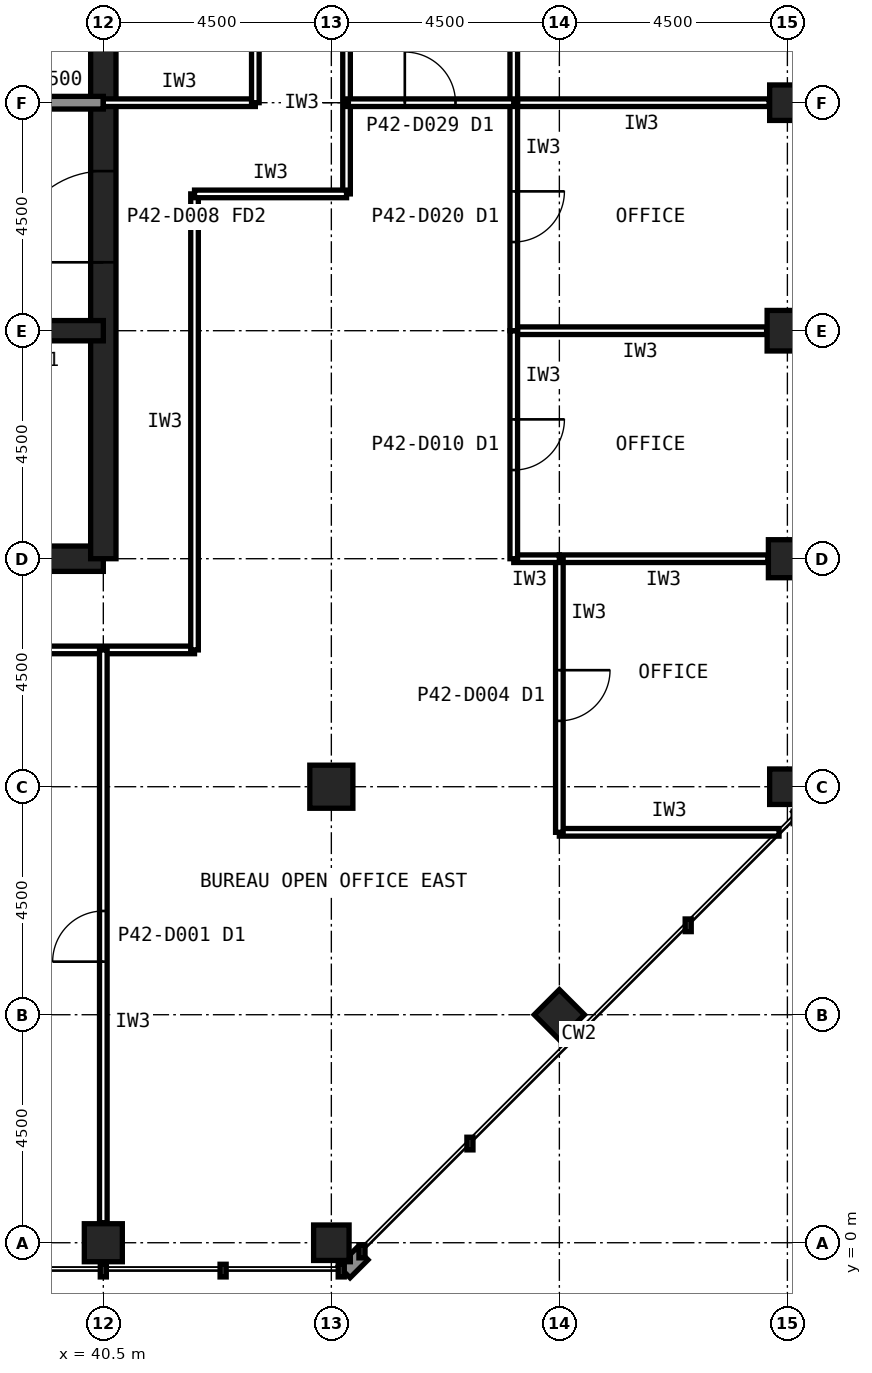
"""IFC4 building model, lengths in metres.
Left out: names, types, materials, properties, quantities, classifications, styles, units other than length and angle.
Written with IfcOpenShell. Run it as: python <this file> out.ifc"""

import sys

from ifc_helpers import new_model, si_unit, direction, frame, frame_2d, origin, origin_2d, place, context, subcontext, project, spatial, rectangle, hollow_rectangle, extrude, element, fill, save


model = new_model("IFC4")
c1 = context("Model", 3, precision=1e-05, world=origin(), true_north=direction((0.0, 1.0)))
c2 = subcontext(c1, "Body", "Model", "MODEL_VIEW")
j1 = project(units=[si_unit("LENGTHUNIT", "METRE"), si_unit("PLANEANGLEUNIT", "RADIAN")], contexts=[c1])
p1 = place(None, origin())
s1 = spatial("IfcSite", under=j1, at=p1, CompositionType="ELEMENT")
p2 = place(p1, origin())
s2 = spatial("IfcBuilding", under=s1, at=p2, CompositionType="ELEMENT")
p3 = place(p2, frame((0.0, 0.0, 175.6)))
s3 = spatial("IfcBuildingStorey", under=s2, at=p3, CompositionType="ELEMENT", Elevation=175.6)
p4 = place(p3, frame((40.5, 0.0, 0.0), z_axis=(0.0, 0.0, 1.0), x_axis=(1.0, 0.0, 0.0)))
e1 = element("IfcColumn", 1, at=p4, inside=s3, PredefinedType="COLUMN", context=c2, shape_type="SweptSolid", body=[
    extrude(hollow_rectangle(XDim=0.75, YDim=0.75, WallThickness=0.04, at=origin_2d()), origin(), (0.0, 0.0, 1.0), 4.0),
])
for number, where, z_axis, x_axis in (
    (2, (45.0, 0.0, 0.0), (0.0, 0.0, 1.0), (1.0, 0.0, 0.0)),
    (3, (54.0, 9.0, 0.0), (0.0, 0.0, 1.0), (1.0, 0.0, 0.0)),
):
    element("IfcColumn", number, at=place(p3, frame(where, z_axis=z_axis, x_axis=x_axis)), inside=s3, PredefinedType="COLUMN", context=c2, shape_type="SweptSolid", body=[
        extrude(hollow_rectangle(XDim=0.7, YDim=0.7, WallThickness=0.036, at=origin_2d()), origin(), (0.0, 0.0, 1.0), 4.0),
    ])
p5 = place(p3, frame((54.0, 13.5, 0.0), z_axis=(0.0, 0.0, 1.0), x_axis=(1.0, 0.0, 0.0)))
e4 = element("IfcColumn", 4, at=p5, inside=s3, PredefinedType="COLUMN", context=c2, shape_type="SweptSolid", body=[
    extrude(hollow_rectangle(XDim=0.75, YDim=0.75, WallThickness=0.04, at=origin_2d()), origin(), (0.0, 0.0, 1.0), 4.0),
])
p6 = place(p3, frame((54.0, 18.0, 0.0), z_axis=(0.0, 0.0, 1.0), x_axis=(1.0, 0.0, 0.0)))
e5 = element("IfcColumn", 5, at=p6, inside=s3, PredefinedType="COLUMN", context=c2, shape_type="SweptSolid", body=[
    extrude(hollow_rectangle(XDim=0.8, YDim=0.8, WallThickness=0.045, at=origin_2d()), origin(), (0.0, 0.0, 1.0), 4.0),
])
for number, where, z_axis, x_axis in (
    (6, (54.0, 22.5, 0.0), (0.0, 0.0, 1.0), (1.0, 0.0, 0.0)),
    (7, (49.5, 4.5, 0.0), (0.0, 0.0, 1.0), (0.707, 0.707, 0.0)),
):
    element("IfcColumn", number, at=place(p3, frame(where, z_axis=z_axis, x_axis=x_axis)), inside=s3, PredefinedType="COLUMN", context=c2, shape_type="SweptSolid", body=[
        extrude(hollow_rectangle(XDim=0.7, YDim=0.7, WallThickness=0.036, at=origin_2d()), origin(), (0.0, 0.0, 1.0), 4.0),
    ])
p7 = place(p3, frame((45.0, 9.0, 0.0), z_axis=(0.0, 0.0, 1.0), x_axis=(1.0, 0.0, 0.0)))
e8 = element("IfcColumn", 8, at=p7, inside=s3, PredefinedType="COLUMN", context=c2, shape_type="SweptSolid", body=[
    extrude(hollow_rectangle(XDim=0.85, YDim=0.85, WallThickness=0.05, at=origin_2d()), origin(), (0.0, 0.0, 1.0), 4.0),
])
p8 = place(p3, frame((13.5, 13.5, 0.0), z_axis=(0.0, 0.0, 1.0), x_axis=(1.0, 0.0, 0.0)))
e9 = element("IfcWall", 9, at=p8, inside=s3, PredefinedType="SHEAR", context=c2, shape_type="SweptSolid", body=[
    extrude(rectangle(XDim=27.0, YDim=0.5, at=frame_2d((13.5, 0.0))), origin(), (0.0, 0.0, 1.0), 4.0),
])
p9 = place(p3, frame((40.5, 13.5, 0.0), z_axis=(0.0, 0.0, 1.0), x_axis=(0.0, 1.0, 0.0)))
e10 = element("IfcWall", 10, at=p9, inside=s3, PredefinedType="SHEAR", context=c2, shape_type="SweptSolid", body=[
    extrude(rectangle(XDim=27.0, YDim=0.5, at=frame_2d((13.5, 0.0))), origin(), (0.0, 0.0, 1.0), 4.0),
])
p10 = place(p9, frame((5.85, 0.0, 0.0)))
e11 = element("IfcOpeningElement", 11, at=p10, cuts=e10, PredefinedType="OPENING", context=c2, shape_type="SweptSolid", body=[
    extrude(rectangle(XDim=1.8, YDim=2.1, at=frame_2d((0.9, 1.05))), frame((0.0, 0.26, 0.0), z_axis=(0.0, -1.0, 0.0), x_axis=(1.0, 0.0, 0.0)), (0.0, 0.0, 1.0), 0.52),
])
p11 = place(p9, frame((19.65, 0.0, 0.0)))
e12 = element("IfcOpeningElement", 12, at=p11, cuts=e10, PredefinedType="OPENING", context=c2, shape_type="SweptSolid", body=[
    extrude(rectangle(XDim=1.2, YDim=2.1, at=frame_2d((0.6, 1.05))), frame((0.0, 0.26, 0.0), z_axis=(0.0, -1.0, 0.0), x_axis=(1.0, 0.0, 0.0)), (0.0, 0.0, 1.0), 0.52),
])
p12 = place(p3, frame((13.5, 18.0, 0.0), z_axis=(0.0, 0.0, 1.0), x_axis=(1.0, 0.0, 0.0)))
e13 = element("IfcWall", 13, at=p12, inside=s3, PredefinedType="SHEAR", context=c2, shape_type="SweptSolid", body=[
    extrude(rectangle(XDim=27.0, YDim=0.4, at=frame_2d((13.5, 0.0))), origin(), (0.0, 0.0, 1.0), 4.0),
])
p13 = place(p12, frame((24.3, 0.0, 0.0)))
e14 = element("IfcOpeningElement", 14, at=p13, cuts=e13, PredefinedType="OPENING", context=c2, shape_type="SweptSolid", body=[
    extrude(rectangle(XDim=0.9, YDim=2.1, at=frame_2d((0.45, 1.05))), frame((0.0, 0.21, 0.0), z_axis=(0.0, -1.0, 0.0), x_axis=(1.0, 0.0, 0.0)), (0.0, 0.0, 1.0), 0.42),
])
p14 = place(p12, frame((5.45, 0.0, 0.0)))
e15 = element("IfcOpeningElement", 15, at=p14, cuts=e13, PredefinedType="OPENING", context=c2, shape_type="SweptSolid", body=[
    extrude(rectangle(XDim=1.1, YDim=2.1, at=frame_2d((0.55, 1.05))), frame((0.0, 0.21, 0.0), z_axis=(0.0, -1.0, 0.0), x_axis=(1.0, 0.0, 0.0)), (0.0, 0.0, 1.0), 0.42),
])
p15 = place(p12, frame((8.45, 0.0, 0.0)))
e16 = element("IfcOpeningElement", 16, at=p15, cuts=e13, PredefinedType="OPENING", context=c2, shape_type="SweptSolid", body=[
    extrude(rectangle(XDim=1.1, YDim=2.1, at=frame_2d((0.55, 1.05))), frame((0.0, 0.21, 0.0), z_axis=(0.0, -1.0, 0.0), x_axis=(1.0, 0.0, 0.0)), (0.0, 0.0, 1.0), 0.42),
])
p16 = place(p12, frame((11.45, 0.0, 0.0)))
e17 = element("IfcOpeningElement", 17, at=p16, cuts=e13, PredefinedType="OPENING", context=c2, shape_type="SweptSolid", body=[
    extrude(rectangle(XDim=1.1, YDim=2.1, at=frame_2d((0.55, 1.05))), frame((0.0, 0.21, 0.0), z_axis=(0.0, -1.0, 0.0), x_axis=(1.0, 0.0, 0.0)), (0.0, 0.0, 1.0), 0.42),
])
p17 = place(p12, frame((14.45, 0.0, 0.0)))
e18 = element("IfcOpeningElement", 18, at=p17, cuts=e13, PredefinedType="OPENING", context=c2, shape_type="SweptSolid", body=[
    extrude(rectangle(XDim=1.1, YDim=2.1, at=frame_2d((0.55, 1.05))), frame((0.0, 0.21, 0.0), z_axis=(0.0, -1.0, 0.0), x_axis=(1.0, 0.0, 0.0)), (0.0, 0.0, 1.0), 0.42),
])
p18 = place(p12, frame((17.45, 0.0, 0.0)))
e19 = element("IfcOpeningElement", 19, at=p18, cuts=e13, PredefinedType="OPENING", context=c2, shape_type="SweptSolid", body=[
    extrude(rectangle(XDim=1.1, YDim=2.1, at=frame_2d((0.55, 1.05))), frame((0.0, 0.21, 0.0), z_axis=(0.0, -1.0, 0.0), x_axis=(1.0, 0.0, 0.0)), (0.0, 0.0, 1.0), 0.42),
])
p19 = place(p12, frame((20.45, 0.0, 0.0)))
e20 = element("IfcOpeningElement", 20, at=p19, cuts=e13, PredefinedType="OPENING", context=c2, shape_type="SweptSolid", body=[
    extrude(rectangle(XDim=1.1, YDim=2.1, at=frame_2d((0.55, 1.05))), frame((0.0, 0.21, 0.0), z_axis=(0.0, -1.0, 0.0), x_axis=(1.0, 0.0, 0.0)), (0.0, 0.0, 1.0), 0.42),
])
p20 = place(p12, frame((1.6, 0.0, 0.0)))
e21 = element("IfcOpeningElement", 21, at=p20, cuts=e13, PredefinedType="OPENING", context=c2, shape_type="SweptSolid", body=[
    extrude(rectangle(XDim=1.3, YDim=2.2, at=frame_2d((0.65, 1.1))), frame((0.0, 0.21, 0.0), z_axis=(0.0, -1.0, 0.0), x_axis=(1.0, 0.0, 0.0)), (0.0, 0.0, 1.0), 0.42),
])
p21 = place(p3, frame((13.5, 22.5, 0.0), z_axis=(0.0, 0.0, 1.0), x_axis=(1.0, 0.0, 0.0)))
e22 = element("IfcWall", 22, at=p21, inside=s3, PredefinedType="SOLIDWALL", context=c2, shape_type="SweptSolid", body=[
    extrude(rectangle(XDim=27.0, YDim=0.25, at=frame_2d((13.5, 0.0))), origin(), (0.0, 0.0, 1.0), 3.84),
])
p22 = place(p21, frame((1.65, 0.0, 0.0)))
e23 = element("IfcOpeningElement", 23, at=p22, cuts=e22, PredefinedType="OPENING", context=c2, shape_type="SweptSolid", body=[
    extrude(rectangle(XDim=1.2, YDim=2.1, at=frame_2d((0.6, 1.05))), frame((0.0, 0.135, 0.0), z_axis=(0.0, -1.0, 0.0), x_axis=(1.0, 0.0, 0.0)), (0.0, 0.0, 1.0), 0.27),
])
p23 = place(p21, frame((6.025, 0.0, 0.0)))
e24 = element("IfcOpeningElement", 24, at=p23, cuts=e22, PredefinedType="OPENING", context=c2, shape_type="SweptSolid", body=[
    extrude(rectangle(XDim=1.0, YDim=2.1, at=frame_2d((0.5, 1.05))), frame((0.0, 0.135, 0.0), z_axis=(0.0, -1.0, 0.0), x_axis=(1.0, 0.0, 0.0)), (0.0, 0.0, 1.0), 0.27),
])
p24 = place(p21, frame((10.525, 0.0, 0.0)))
e25 = element("IfcOpeningElement", 25, at=p24, cuts=e22, PredefinedType="OPENING", context=c2, shape_type="SweptSolid", body=[
    extrude(rectangle(XDim=1.0, YDim=2.1, at=frame_2d((0.5, 1.05))), frame((0.0, 0.135, 0.0), z_axis=(0.0, -1.0, 0.0), x_axis=(1.0, 0.0, 0.0)), (0.0, 0.0, 1.0), 0.27),
])
p25 = place(p21, frame((19.75, 0.0, 0.0)))
e26 = element("IfcOpeningElement", 26, at=p25, cuts=e22, PredefinedType="OPENING", context=c2, shape_type="SweptSolid", body=[
    extrude(rectangle(XDim=1.0, YDim=2.1, at=frame_2d((0.5, 1.05))), frame((0.0, 0.135, 0.0), z_axis=(0.0, -1.0, 0.0), x_axis=(1.0, 0.0, 0.0)), (0.0, 0.0, 1.0), 0.27),
])
p26 = place(p21, frame((15.05, 0.0, 0.0)))
e27 = element("IfcOpeningElement", 27, at=p26, cuts=e22, PredefinedType="OPENING", context=c2, shape_type="SweptSolid", body=[
    extrude(rectangle(XDim=1.4, YDim=2.4, at=frame_2d((0.7, 1.2))), frame((0.0, 0.135, 0.0), z_axis=(0.0, -1.0, 0.0), x_axis=(1.0, 0.0, 0.0)), (0.0, 0.0, 1.0), 0.27),
])
p27 = place(p3, frame((45.3, 20.7, 0.0), z_axis=(0.0, 0.0, 1.0), x_axis=(0.0, 1.0, 0.0)))
e28 = element("IfcWall", 28, at=p27, inside=s3, PredefinedType="PARTITIONING", context=c2, shape_type="SweptSolid", body=[
    extrude(rectangle(XDim=12.6, YDim=0.15, at=frame_2d((6.3, 0.0))), origin(), (0.0, 0.0, 1.0), 3.84),
])
p28 = place(p27, frame((5.8, 0.0, 0.0)))
e29 = element("IfcOpeningElement", 29, at=p28, cuts=e28, PredefinedType="OPENING", context=c2, shape_type="SweptSolid", body=[
    extrude(rectangle(XDim=1.0, YDim=2.1, at=frame_2d((0.5, 1.05))), frame((0.0, 0.085, 0.0), z_axis=(0.0, -1.0, 0.0), x_axis=(1.0, 0.0, 0.0)), (0.0, 0.0, 1.0), 0.17),
])
for number, where, z_axis, x_axis in (
    (30, (33.3, 11.7, 0.0), (0.0, 0.0, 1.0), (1.0, 0.0, 0.0)),
    (31, (42.3, 11.7, 0.0), (0.0, 0.0, 1.0), (0.0, 1.0, 0.0)),
):
    element("IfcWall", number, at=place(p3, frame(where, z_axis=z_axis, x_axis=x_axis)), inside=s3, PredefinedType="PARTITIONING", context=c2, shape_type="SweptSolid", body=[
        extrude(rectangle(XDim=9.0, YDim=0.15, at=frame_2d((4.5, 0.0))), origin(), (0.0, 0.0, 1.0), 3.84),
    ])
p29 = place(p3, frame((42.3, 20.7, 0.0), z_axis=(0.0, 0.0, 1.0), x_axis=(1.0, 0.0, 0.0)))
e32 = element("IfcWall", 32, at=p29, inside=s3, PredefinedType="PARTITIONING", context=c2, shape_type="SweptSolid", body=[
    extrude(rectangle(XDim=3.0, YDim=0.15, at=frame_2d((1.5, 0.0))), origin(), (0.0, 0.0, 1.0), 3.84),
])
p30 = place(p3, frame((49.5, 8.1, 0.0), z_axis=(0.0, 0.0, 1.0), x_axis=(1.0, 0.0, 0.0)))
e33 = element("IfcWall", 33, at=p30, inside=s3, PredefinedType="PARTITIONING", context=c2, shape_type="SweptSolid", body=[
    extrude(rectangle(XDim=4.335, YDim=0.15, at=frame_2d((2.168, 0.0))), origin(), (0.0, 0.0, 1.0), 3.84),
])
p31 = place(p3, frame((53.615, 13.5, 0.0), z_axis=(0.0, 0.0, 1.0), x_axis=(-1.0, 0.0, 0.0)))
e34 = element("IfcWall", 34, at=p31, inside=s3, PredefinedType="PARTITIONING", context=c2, shape_type="SweptSolid", body=[
    extrude(rectangle(XDim=4.115, YDim=0.15, at=frame_2d((2.058, 0.0))), origin(), (0.0, 0.0, 1.0), 2.989),
])
p32 = place(p3, frame((49.5, 13.5, 0.0), z_axis=(0.0, 0.0, 1.0), x_axis=(0.0, -1.0, 0.0)))
e35 = element("IfcWall", 35, at=p32, inside=s3, PredefinedType="PARTITIONING", context=c2, shape_type="SweptSolid", body=[
    extrude(rectangle(XDim=5.4, YDim=0.15, at=frame_2d((2.7, 0.0))), origin(), (0.0, 0.0, 1.0), 3.84),
])
p33 = place(p32, frame((2.2, 0.0, 0.0)))
e36 = element("IfcOpeningElement", 36, at=p33, cuts=e35, PredefinedType="OPENING", context=c2, shape_type="SweptSolid", body=[
    extrude(rectangle(XDim=1.0, YDim=2.1, at=frame_2d((0.5, 1.05))), frame((0.0, 0.085, 0.0), z_axis=(0.0, -1.0, 0.0), x_axis=(1.0, 0.0, 0.0)), (0.0, 0.0, 1.0), 0.17),
])
p34 = place(p3, frame((48.6, 13.5, 0.0), z_axis=(0.0, 0.0, 1.0), x_axis=(1.0, 0.0, 0.0)))
e37 = element("IfcWall", 37, at=p34, inside=s3, PredefinedType="PARTITIONING", context=c2, shape_type="SweptSolid", body=[
    extrude(rectangle(XDim=0.9, YDim=0.15, at=frame_2d((0.45, 0.0))), origin(), (0.0, 0.0, 1.0), 2.989),
])
p35 = place(p3, frame((53.59, 18.0, 0.0), z_axis=(0.0, 0.0, 1.0), x_axis=(-1.0, 0.0, 0.0)))
e38 = element("IfcWall", 38, at=p35, inside=s3, PredefinedType="PARTITIONING", context=c2, shape_type="SweptSolid", body=[
    extrude(rectangle(XDim=4.99, YDim=0.15, at=frame_2d((2.495, 0.0))), origin(), (0.0, 0.0, 1.0), 2.989),
])
p36 = place(p3, frame((48.6, 18.0, 0.0), z_axis=(0.0, 0.0, 1.0), x_axis=(0.0, -1.0, 0.0)))
e39 = element("IfcWall", 39, at=p36, inside=s3, PredefinedType="PARTITIONING", context=c2, shape_type="SweptSolid", body=[
    extrude(rectangle(XDim=4.5, YDim=0.15, at=frame_2d((2.25, 0.0))), origin(), (0.0, 0.0, 1.0), 3.84),
])
p37 = place(p36, frame((1.75, 0.0, 0.0)))
e40 = element("IfcOpeningElement", 40, at=p37, cuts=e39, PredefinedType="OPENING", context=c2, shape_type="SweptSolid", body=[
    extrude(rectangle(XDim=1.0, YDim=2.1, at=frame_2d((0.5, 1.05))), frame((0.0, 0.085, 0.0), z_axis=(0.0, -1.0, 0.0), x_axis=(1.0, 0.0, 0.0)), (0.0, 0.0, 1.0), 0.17),
])
p38 = place(p3, frame((53.64, 22.5, 0.0), z_axis=(0.0, 0.0, 1.0), x_axis=(-1.0, 0.0, 0.0)))
e41 = element("IfcWall", 41, at=p38, inside=s3, PredefinedType="PARTITIONING", context=c2, shape_type="SweptSolid", body=[
    extrude(rectangle(XDim=5.04, YDim=0.15, at=frame_2d((2.52, 0.0))), origin(), (0.0, 0.0, 1.0), 2.989),
])
p39 = place(p3, frame((48.6, 22.5, 0.0), z_axis=(0.0, 0.0, 1.0), x_axis=(0.0, -1.0, 0.0)))
e42 = element("IfcWall", 42, at=p39, inside=s3, PredefinedType="PARTITIONING", context=c2, shape_type="SweptSolid", body=[
    extrude(rectangle(XDim=4.5, YDim=0.15, at=frame_2d((2.25, 0.0))), origin(), (0.0, 0.0, 1.0), 3.84),
])
p40 = place(p39, frame((1.75, 0.0, 0.0)))
e43 = element("IfcOpeningElement", 43, at=p40, cuts=e42, PredefinedType="OPENING", context=c2, shape_type="SweptSolid", body=[
    extrude(rectangle(XDim=1.0, YDim=2.1, at=frame_2d((0.5, 1.05))), frame((0.0, 0.085, 0.0), z_axis=(0.0, -1.0, 0.0), x_axis=(1.0, 0.0, 0.0)), (0.0, 0.0, 1.0), 0.17),
])
p41 = place(p3, frame((48.6, 27.0, 0.0), z_axis=(0.0, 0.0, 1.0), x_axis=(0.0, -1.0, 0.0)))
e44 = element("IfcWall", 44, at=p41, inside=s3, PredefinedType="PARTITIONING", context=c2, shape_type="SweptSolid", body=[
    extrude(rectangle(XDim=4.5, YDim=0.15, at=frame_2d((2.25, 0.0))), origin(), (0.0, 0.0, 1.0), 3.84),
])
p42 = place(p41, frame((1.75, 0.0, 0.0)))
e45 = element("IfcOpeningElement", 45, at=p42, cuts=e44, PredefinedType="OPENING", context=c2, shape_type="SweptSolid", body=[
    extrude(rectangle(XDim=1.0, YDim=2.1, at=frame_2d((0.5, 1.05))), frame((0.0, 0.085, 0.0), z_axis=(0.0, -1.0, 0.0), x_axis=(1.0, 0.0, 0.0)), (0.0, 0.0, 1.0), 0.17),
])
p43 = place(p3, frame((40.5, 22.5, 0.0), z_axis=(0.0, 0.0, 1.0), x_axis=(1.0, 0.0, 0.0)))
e46 = element("IfcWall", 46, at=p43, inside=s3, PredefinedType="PARTITIONING", context=c2, shape_type="SweptSolid", body=[
    extrude(rectangle(XDim=3.0, YDim=0.15, at=frame_2d((1.5, 0.0))), origin(), (0.0, 0.0, 1.0), 2.989),
])
p44 = place(p3, frame((43.5, 22.5, 0.0), z_axis=(0.0, 0.0, 1.0), x_axis=(0.0, 1.0, 0.0)))
e47 = element("IfcWall", 47, at=p44, inside=s3, PredefinedType="PARTITIONING", context=c2, shape_type="SweptSolid", body=[
    extrude(rectangle(XDim=9.0, YDim=0.15, at=frame_2d((4.5, 0.0))), origin(), (0.0, 0.0, 1.0), 3.84),
])
p45 = place(p3, frame((40.5, 0.395, 0.0), z_axis=(0.0, 0.0, 1.0), x_axis=(0.0, 1.0, 0.0)))
e48 = element("IfcWall", 48, at=p45, inside=s3, PredefinedType="PARTITIONING", context=c2, shape_type="SweptSolid", body=[
    extrude(rectangle(XDim=11.305, YDim=0.15, at=frame_2d((5.652, 0.0))), origin(), (0.0, 0.0, 1.0), 2.989),
])
p46 = place(p45, frame((5.153, 0.0, 0.0)))
e49 = element("IfcOpeningElement", 49, at=p46, cuts=e48, PredefinedType="OPENING", context=c2, shape_type="SweptSolid", body=[
    extrude(rectangle(XDim=1.0, YDim=2.1, at=frame_2d((0.5, 1.05))), frame((0.0, 0.085, 0.0), z_axis=(0.0, -1.0, 0.0), x_axis=(1.0, 0.0, 0.0)), (0.0, 0.0, 1.0), 0.17),
])
p47 = place(p3, frame((45.3, 22.5, 0.0), z_axis=(0.0, 0.0, 1.0), x_axis=(1.0, 0.0, 0.0)))
e50 = element("IfcWall", 50, at=p47, inside=s3, PredefinedType="PARTITIONING", context=c2, shape_type="SweptSolid", body=[
    extrude(rectangle(XDim=3.3, YDim=0.15, at=frame_2d((1.65, 0.0))), origin(), (0.0, 0.0, 1.0), 2.989),
])
p48 = place(p47, frame((1.15, 0.0, 0.0)))
e51 = element("IfcOpeningElement", 51, at=p48, cuts=e50, PredefinedType="OPENING", context=c2, shape_type="SweptSolid", body=[
    extrude(rectangle(XDim=1.0, YDim=2.1, at=frame_2d((0.5, 1.05))), frame((0.0, 0.085, 0.0), z_axis=(0.0, -1.0, 0.0), x_axis=(1.0, 0.0, 0.0)), (0.0, 0.0, 1.0), 0.17),
])
p49 = place(p10, origin())
e52 = element("IfcDoor", 52, at=p49, inside=s3, OperationType="SINGLE_SWING_LEFT", PredefinedType="DOOR", context=c2, shape_type="SweptSolid", body=[
    extrude(rectangle(XDim=1.8, YDim=2.1, at=frame_2d((0.9, 1.05))), frame((0.0, 0.025, 0.0), z_axis=(0.0, -1.0, 0.0), x_axis=(1.0, 0.0, 0.0)), (0.0, 0.0, 1.0), 0.05),
])
fill(e11, e52)
p50 = place(p33, origin())
e53 = element("IfcDoor", 53, at=p50, inside=s3, OperationType="SINGLE_SWING_LEFT", PredefinedType="DOOR", context=c2, shape_type="SweptSolid", body=[
    extrude(rectangle(XDim=1.0, YDim=2.1, at=frame_2d((0.5, 1.05))), frame((0.0, 0.025, 0.0), z_axis=(0.0, -1.0, 0.0), x_axis=(1.0, 0.0, 0.0)), (0.0, 0.0, 1.0), 0.05),
])
fill(e36, e53)
p51 = place(p37, origin())
e54 = element("IfcDoor", 54, at=p51, inside=s3, OperationType="SINGLE_SWING_LEFT", PredefinedType="DOOR", context=c2, shape_type="SweptSolid", body=[
    extrude(rectangle(XDim=1.0, YDim=2.1, at=frame_2d((0.5, 1.05))), frame((0.0, 0.025, 0.0), z_axis=(0.0, -1.0, 0.0), x_axis=(1.0, 0.0, 0.0)), (0.0, 0.0, 1.0), 0.05),
])
fill(e40, e54)
p52 = place(p40, origin())
e55 = element("IfcDoor", 55, at=p52, inside=s3, OperationType="SINGLE_SWING_LEFT", PredefinedType="DOOR", context=c2, shape_type="SweptSolid", body=[
    extrude(rectangle(XDim=1.0, YDim=2.1, at=frame_2d((0.5, 1.05))), frame((0.0, 0.025, 0.0), z_axis=(0.0, -1.0, 0.0), x_axis=(1.0, 0.0, 0.0)), (0.0, 0.0, 1.0), 0.05),
])
fill(e43, e55)
p53 = place(p46, origin())
e56 = element("IfcDoor", 56, at=p53, inside=s3, OperationType="SINGLE_SWING_LEFT", PredefinedType="DOOR", context=c2, shape_type="SweptSolid", body=[
    extrude(rectangle(XDim=1.0, YDim=2.1, at=frame_2d((0.5, 1.05))), frame((0.0, 0.025, 0.0), z_axis=(0.0, -1.0, 0.0), x_axis=(1.0, 0.0, 0.0)), (0.0, 0.0, 1.0), 0.05),
])
fill(e49, e56)
p54 = place(p48, origin())
e57 = element("IfcDoor", 57, at=p54, inside=s3, OperationType="SINGLE_SWING_LEFT", PredefinedType="DOOR", context=c2, shape_type="SweptSolid", body=[
    extrude(rectangle(XDim=1.0, YDim=2.1, at=frame_2d((0.5, 1.05))), frame((0.0, 0.025, 0.0), z_axis=(0.0, -1.0, 0.0), x_axis=(1.0, 0.0, 0.0)), (0.0, 0.0, 1.0), 0.05),
])
fill(e51, e57)
save(model, sys.argv[1])
